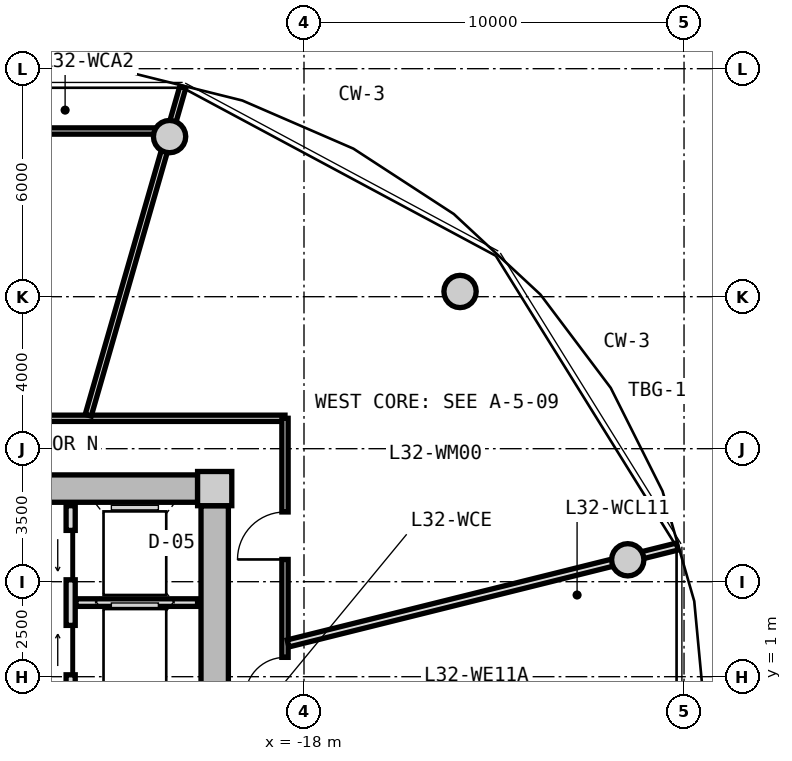
"""IFC4 building model, lengths in metres.
Left out: names, types, materials, properties, quantities, classifications, styles, units other than length and angle.
Written with IfcOpenShell. Run it as: python <this file> out.ifc"""

import sys

from ifc_helpers import new_model, si_unit, direction, frame, frame_2d, origin, origin_2d, place, context, subcontext, project, spatial, rectangle, circle, extrude, source, transform, mapped, element, fill, save


model = new_model("IFC4")
c1 = context("Model", 3, precision=1e-05, world=origin(), true_north=direction((0.0, 1.0)))
c2 = subcontext(c1, "Body", "Model", "MODEL_VIEW")
j1 = project(units=[si_unit("LENGTHUNIT", "METRE"), si_unit("PLANEANGLEUNIT", "RADIAN")], contexts=[c1])
p1 = place(None, origin())
s1 = spatial("IfcSite", under=j1, at=p1, CompositionType="ELEMENT")
p2 = place(p1, origin())
s2 = spatial("IfcBuilding", under=s1, at=p2, CompositionType="ELEMENT")
p3 = place(p2, frame((0.0, 0.0, 105.4)))
s3 = spatial("IfcBuildingStorey", under=s2, at=p3, CompositionType="ELEMENT", Elevation=105.4)
m1 = source(origin(), c2, "Body", "SweptSolid", [
    extrude(rectangle(XDim=0.9, YDim=0.9, at=origin_2d()), origin(), (0.0, 0.0, 1.0), 3.05),
])
p4 = place(p3, frame((-20.35, 5.95, 0.0), z_axis=(0.0, 0.0, 1.0), x_axis=(1.0, 0.0, 0.0)))
e1 = element("IfcColumn", 1, at=p4, inside=s3, PredefinedType="COLUMN", context=c2, shape_type="MappedRepresentation", body=[
    mapped(m1, transform((0.0, 0.0, 0.0), x_axis=(1.0, 0.0, 0.0), y_axis=(0.0, 1.0, 0.0), z_axis=(0.0, 0.0, 1.0), scale=1.0)),
])
m2 = source(origin(), c2, "Body", "SweptSolid", [
    extrude(rectangle(XDim=14.4, YDim=0.72, at=frame_2d((7.2, 0.0))), origin(), (0.0, 0.0, 1.0), 2.79),
])
p5 = place(p3, frame((-35.2, 5.95, 0.0), z_axis=(0.0, 0.0, 1.0), x_axis=(1.0, 0.0, 0.0)))
e2 = element("IfcWall", 2, at=p5, inside=s3, PredefinedType="SHEAR", context=c2, shape_type="MappedRepresentation", body=[
    mapped(m2, transform((0.0, 0.0, 0.0), x_axis=(1.0, 0.0, 0.0), y_axis=(0.0, 1.0, 0.0), z_axis=(0.0, 0.0, 1.0), scale=1.0)),
])
m3 = source(origin(), c2, "Body", "SweptSolid", [
    extrude(rectangle(XDim=11.0, YDim=0.72, at=frame_2d((5.5, 0.0))), origin(), (0.0, 0.0, 1.0), 2.79),
])
p6 = place(p3, frame((-20.35, 5.5, 0.0), z_axis=(0.0, 0.0, 1.0), x_axis=(0.0, -1.0, 0.0)))
e3 = element("IfcWall", 3, at=p6, inside=s3, PredefinedType="SHEAR", context=c2, shape_type="MappedRepresentation", body=[
    mapped(m3, transform((0.0, 0.0, 0.0), x_axis=(1.0, 0.0, 0.0), y_axis=(0.0, 1.0, 0.0), z_axis=(0.0, 0.0, 1.0), scale=1.0)),
])
p7 = place(p6, frame((5.65, 0.0, 0.0)))
e4 = element("IfcOpeningElement", 4, at=p7, cuts=e3, PredefinedType="OPENING", context=c2, shape_type="SweptSolid", body=[
    extrude(rectangle(XDim=1.2, YDim=2.15, at=frame_2d((0.6, 1.075))), frame((0.0, 0.37, 0.0), z_axis=(0.0, -1.0, 0.0), x_axis=(1.0, 0.0, 0.0)), (0.0, 0.0, 1.0), 0.74),
])
m4 = source(origin(), c2, "Body", "SweptSolid", [
    extrude(circle(Radius=0.425, at=origin_2d()), origin(), (0.0, 0.0, 1.0), 3.05),
])
for number, where, z_axis, x_axis in (
    (5, (-9.481, 4.076, 0.0), (0.0, 0.0, 1.0), (1.0, 0.0, 0.0)),
    (6, (-13.894, 11.137, 0.0), (0.0, 0.0, 1.0), (1.0, 0.0, 0.0)),
    (7, (-21.537, 15.213, 0.0), (0.0, 0.0, 1.0), (1.0, 0.0, 0.0)),
):
    element("IfcColumn", number, at=place(p3, frame(where, z_axis=z_axis, x_axis=x_axis)), inside=s3, PredefinedType="COLUMN", context=c2, shape_type="MappedRepresentation", body=[
        mapped(m4, transform((0.0, 0.0, 0.0), x_axis=(1.0, 0.0, 0.0), y_axis=(0.0, 1.0, 0.0), z_axis=(0.0, 0.0, 1.0), scale=1.0)),
    ])
m5 = source(origin(), c2, "Body", "SweptSolid", [
    extrude(rectangle(XDim=5.0, YDim=0.24, at=frame_2d((2.5, 0.0))), origin(), (0.0, 0.0, 1.0), 2.775),
])
p8 = place(p3, frame((-24.14, 0.5, 0.0), z_axis=(0.0, 0.0, 1.0), x_axis=(0.0, 1.0, 0.0)))
e8 = element("IfcWall", 8, at=p8, inside=s3, PredefinedType="PARTITIONING", context=c2, shape_type="MappedRepresentation", body=[
    mapped(m5, transform((0.0, 0.0, 0.0), x_axis=(1.0, 0.0, 0.0), y_axis=(0.0, 1.0, 0.0), z_axis=(0.0, 0.0, 1.0), scale=1.0)),
])
p9 = place(p8, frame((3.05, 0.0, 0.0)))
e9 = element("IfcOpeningElement", 9, at=p9, cuts=e8, PredefinedType="OPENING", context=c2, shape_type="SweptSolid", body=[
    extrude(rectangle(XDim=1.3, YDim=2.2, at=frame_2d((0.65, 1.1))), frame((0.0, 0.13, 0.0), z_axis=(0.0, -1.0, 0.0), x_axis=(1.0, 0.0, 0.0)), (0.0, 0.0, 1.0), 0.26),
])
p10 = place(p8, frame((0.55, 0.0, 0.0)))
e10 = element("IfcOpeningElement", 10, at=p10, cuts=e8, PredefinedType="OPENING", context=c2, shape_type="SweptSolid", body=[
    extrude(rectangle(XDim=1.3, YDim=2.2, at=frame_2d((0.65, 1.1))), frame((0.0, 0.13, 0.0), z_axis=(0.0, -1.0, 0.0), x_axis=(1.0, 0.0, 0.0)), (0.0, 0.0, 1.0), 0.26),
])
m6 = source(origin(), c2, "Body", "SweptSolid", [
    extrude(rectangle(XDim=3.2, YDim=0.2, at=frame_2d((1.6, 0.0))), origin(), (0.0, 0.0, 1.0), 2.775),
])
p11 = place(p3, frame((-24.0, 2.95, 0.0), z_axis=(0.0, 0.0, 1.0), x_axis=(1.0, 0.0, 0.0)))
e11 = element("IfcWall", 11, at=p11, inside=s3, PredefinedType="PARTITIONING", context=c2, shape_type="MappedRepresentation", body=[
    mapped(m6, transform((0.0, 0.0, 0.0), x_axis=(1.0, 0.0, 0.0), y_axis=(0.0, 1.0, 0.0), z_axis=(0.0, 0.0, 1.0), scale=1.0)),
])
m7 = source(origin(), c2, "Body", "SweptSolid", [
    extrude(rectangle(XDim=8.6, YDim=0.165, at=frame_2d((4.3, 0.0))), origin(), (0.0, 0.0, 1.0), 2.775),
])
p12 = place(p3, frame((-27.1, 7.8, 0.0), z_axis=(0.0, 0.0, 1.0), x_axis=(1.0, 0.0, 0.0)))
e12 = element("IfcWall", 12, at=p12, inside=s3, PredefinedType="PARTITIONING", context=c2, shape_type="MappedRepresentation", body=[
    mapped(m7, transform((0.0, 0.0, 0.0), x_axis=(1.0, 0.0, 0.0), y_axis=(0.0, 1.0, 0.0), z_axis=(0.0, 0.0, 1.0), scale=1.0)),
])
m8 = source(origin(), c2, "Body", "SweptSolid", [
    extrude(rectangle(XDim=15.6, YDim=0.165, at=frame_2d((7.8, 0.0))), origin(), (0.0, 0.0, 1.0), 2.775),
])
p13 = place(p3, frame((-18.5, 7.8, 0.0), z_axis=(0.0, 0.0, 1.0), x_axis=(0.0, -1.0, 0.0)))
e13 = element("IfcWall", 13, at=p13, inside=s3, PredefinedType="PARTITIONING", context=c2, shape_type="MappedRepresentation", body=[
    mapped(m8, transform((0.0, 0.0, 0.0), x_axis=(1.0, 0.0, 0.0), y_axis=(0.0, 1.0, 0.0), z_axis=(0.0, 0.0, 1.0), scale=1.0)),
])
p14 = place(p13, frame((12.002, 0.0, 0.0)))
e14 = element("IfcOpeningElement", 14, at=p14, cuts=e13, PredefinedType="OPENING", context=c2, shape_type="SweptSolid", body=[
    extrude(rectangle(XDim=1.05, YDim=2.15, at=frame_2d((0.525, 1.075))), frame((0.0, 0.093, 0.0), z_axis=(0.0, -1.0, 0.0), x_axis=(1.0, 0.0, 0.0)), (0.0, 0.0, 1.0), 0.185),
])
p15 = place(p13, frame((10.211, 0.0, 0.0)))
e15 = element("IfcOpeningElement", 15, at=p15, cuts=e13, PredefinedType="OPENING", context=c2, shape_type="SweptSolid", body=[
    extrude(rectangle(XDim=1.05, YDim=2.15, at=frame_2d((0.525, 1.075))), frame((0.0, 0.093, 0.0), z_axis=(0.0, -1.0, 0.0), x_axis=(1.0, 0.0, 0.0)), (0.0, 0.0, 1.0), 0.185),
])
p16 = place(p13, frame((7.722, 0.0, 0.0)))
e16 = element("IfcOpeningElement", 16, at=p16, cuts=e13, PredefinedType="OPENING", context=c2, shape_type="SweptSolid", body=[
    extrude(rectangle(XDim=1.05, YDim=2.15, at=frame_2d((0.525, 1.075))), frame((0.0, 0.093, 0.0), z_axis=(0.0, -1.0, 0.0), x_axis=(1.0, 0.0, 0.0)), (0.0, 0.0, 1.0), 0.185),
])
p17 = place(p13, frame((6.291, 0.0, 0.0)))
e17 = element("IfcOpeningElement", 17, at=p17, cuts=e13, PredefinedType="OPENING", context=c2, shape_type="SweptSolid", body=[
    extrude(rectangle(XDim=1.05, YDim=2.15, at=frame_2d((0.525, 1.075))), frame((0.0, 0.093, 0.0), z_axis=(0.0, -1.0, 0.0), x_axis=(1.0, 0.0, 0.0)), (0.0, 0.0, 1.0), 0.185),
])
p18 = place(p13, frame((2.465, 0.0, 0.0)))
e18 = element("IfcOpeningElement", 18, at=p18, cuts=e13, PredefinedType="OPENING", context=c2, shape_type="SweptSolid", body=[
    extrude(rectangle(XDim=1.25, YDim=2.2, at=frame_2d((0.625, 1.1))), frame((0.0, 0.093, 0.0), z_axis=(0.0, -1.0, 0.0), x_axis=(1.0, 0.0, 0.0)), (0.0, 0.0, 1.0), 0.185),
])
m9 = source(origin(), c2, "Body", "SweptSolid", [
    extrude(rectangle(XDim=8.989, YDim=0.165, at=frame_2d((4.495, 0.0))), origin(), (0.0, 0.0, 1.0), 2.275),
])
p19 = place(p3, frame((-23.678, 7.88, 0.0), z_axis=(0.0, 0.0, 1.0), x_axis=(0.27702323008, 0.960863221274, 0.0)))
e19 = element("IfcWall", 19, at=p19, inside=s3, PredefinedType="PARTITIONING", context=c2, shape_type="MappedRepresentation", body=[
    mapped(m9, transform((0.0, 0.0, 0.0), x_axis=(1.0, 0.0, 0.0), y_axis=(0.0, 1.0, 0.0), z_axis=(0.0, 0.0, 1.0), scale=1.0)),
])
m10 = source(origin(), c2, "Body", "SweptSolid", [
    extrude(rectangle(XDim=5.814, YDim=0.165, at=frame_2d((2.907, 0.0))), origin(), (0.0, 0.0, 1.0), 2.275),
])
p20 = place(p3, frame((-27.18, 15.36, 0.0), z_axis=(0.0, 0.0, 1.0), x_axis=(1.0, 0.0, 0.0)))
e20 = element("IfcWall", 20, at=p20, inside=s3, PredefinedType="PARTITIONING", context=c2, shape_type="MappedRepresentation", body=[
    mapped(m10, transform((0.0, 0.0, 0.0), x_axis=(1.0, 0.0, 0.0), y_axis=(0.0, 1.0, 0.0), z_axis=(0.0, 0.0, 1.0), scale=1.0)),
])
m11 = source(origin(), c2, "Body", "SweptSolid", [
    extrude(rectangle(XDim=10.556, YDim=0.19, at=frame_2d((5.278, 0.0))), origin(), (0.0, 0.0, 1.0), 2.275),
])
p21 = place(p3, frame((-18.42, 1.875, 0.0), z_axis=(0.0, 0.0, 1.0), x_axis=(0.970363857851, 0.241648470667, 0.0)))
e21 = element("IfcWall", 21, at=p21, inside=s3, PredefinedType="PARTITIONING", context=c2, shape_type="MappedRepresentation", body=[
    mapped(m11, transform((0.0, 0.0, 0.0), x_axis=(1.0, 0.0, 0.0), y_axis=(0.0, 1.0, 0.0), z_axis=(0.0, 0.0, 1.0), scale=1.0)),
])
m12 = source(origin(), c2, "Body", "SweptSolid", [
    extrude(rectangle(XDim=1.3, YDim=2.2, at=frame_2d((0.65, 1.1))), frame((0.0, 0.025, 0.0), z_axis=(0.0, -1.0, 0.0), x_axis=(1.0, 0.0, 0.0)), (0.0, 0.0, 1.0), 0.05),
])
p22 = place(p9, origin())
e22 = element("IfcDoor", 22, at=p22, inside=s3, OperationType="SLIDING_TO_LEFT", PredefinedType="DOOR", context=c2, shape_type="MappedRepresentation", body=[
    mapped(m12, transform((0.0, 0.0, 0.0), x_axis=(1.0, 0.0, 0.0), y_axis=(0.0, 1.0, 0.0), z_axis=(0.0, 0.0, 1.0), scale=1.0)),
])
fill(e9, e22)
p23 = place(p10, origin())
e23 = element("IfcDoor", 23, at=p23, inside=s3, OperationType="SLIDING_TO_RIGHT", PredefinedType="DOOR", context=c2, shape_type="MappedRepresentation", body=[
    mapped(m12, transform((0.0, 0.0, 0.0), x_axis=(1.0, 0.0, 0.0), y_axis=(0.0, 1.0, 0.0), z_axis=(0.0, 0.0, 1.0), scale=1.0)),
])
fill(e10, e23)
m13 = source(origin(), c2, "Body", "SweptSolid", [
    extrude(rectangle(XDim=1.05, YDim=2.15, at=frame_2d((0.525, 1.075))), frame((0.0, 0.025, 0.0), z_axis=(0.0, -1.0, 0.0), x_axis=(1.0, 0.0, 0.0)), (0.0, 0.0, 1.0), 0.05),
])
p24 = place(p17, frame((1.05, 0.0, 0.0), z_axis=(0.0, 0.0, 1.0), x_axis=(-1.0, 0.0, 0.0)))
e24 = element("IfcDoor", 24, at=p24, inside=s3, OperationType="SINGLE_SWING_LEFT", PredefinedType="DOOR", context=c2, shape_type="MappedRepresentation", body=[
    mapped(m13, transform((0.0, 0.0, 0.0), x_axis=(1.0, 0.0, 0.0), y_axis=(0.0, 1.0, 0.0), z_axis=(0.0, 0.0, 1.0), scale=1.0)),
])
fill(e17, e24)
m14 = source(origin(), c2, "Body", "SweptSolid", [
    extrude(rectangle(XDim=1.25, YDim=2.2, at=frame_2d((0.625, 1.1))), frame((0.0, 0.025, 0.0), z_axis=(0.0, -1.0, 0.0), x_axis=(1.0, 0.0, 0.0)), (0.0, 0.0, 1.0), 0.05),
])
p25 = place(p18, frame((1.25, 0.0, 0.0), z_axis=(0.0, 0.0, 1.0), x_axis=(-1.0, 0.0, 0.0)))
e25 = element("IfcDoor", 25, at=p25, inside=s3, OperationType="SINGLE_SWING_LEFT", PredefinedType="DOOR", context=c2, shape_type="MappedRepresentation", body=[
    mapped(m14, transform((0.0, 0.0, 0.0), x_axis=(1.0, 0.0, 0.0), y_axis=(0.0, 1.0, 0.0), z_axis=(0.0, 0.0, 1.0), scale=1.0)),
])
fill(e18, e25)
save(model, sys.argv[1])
